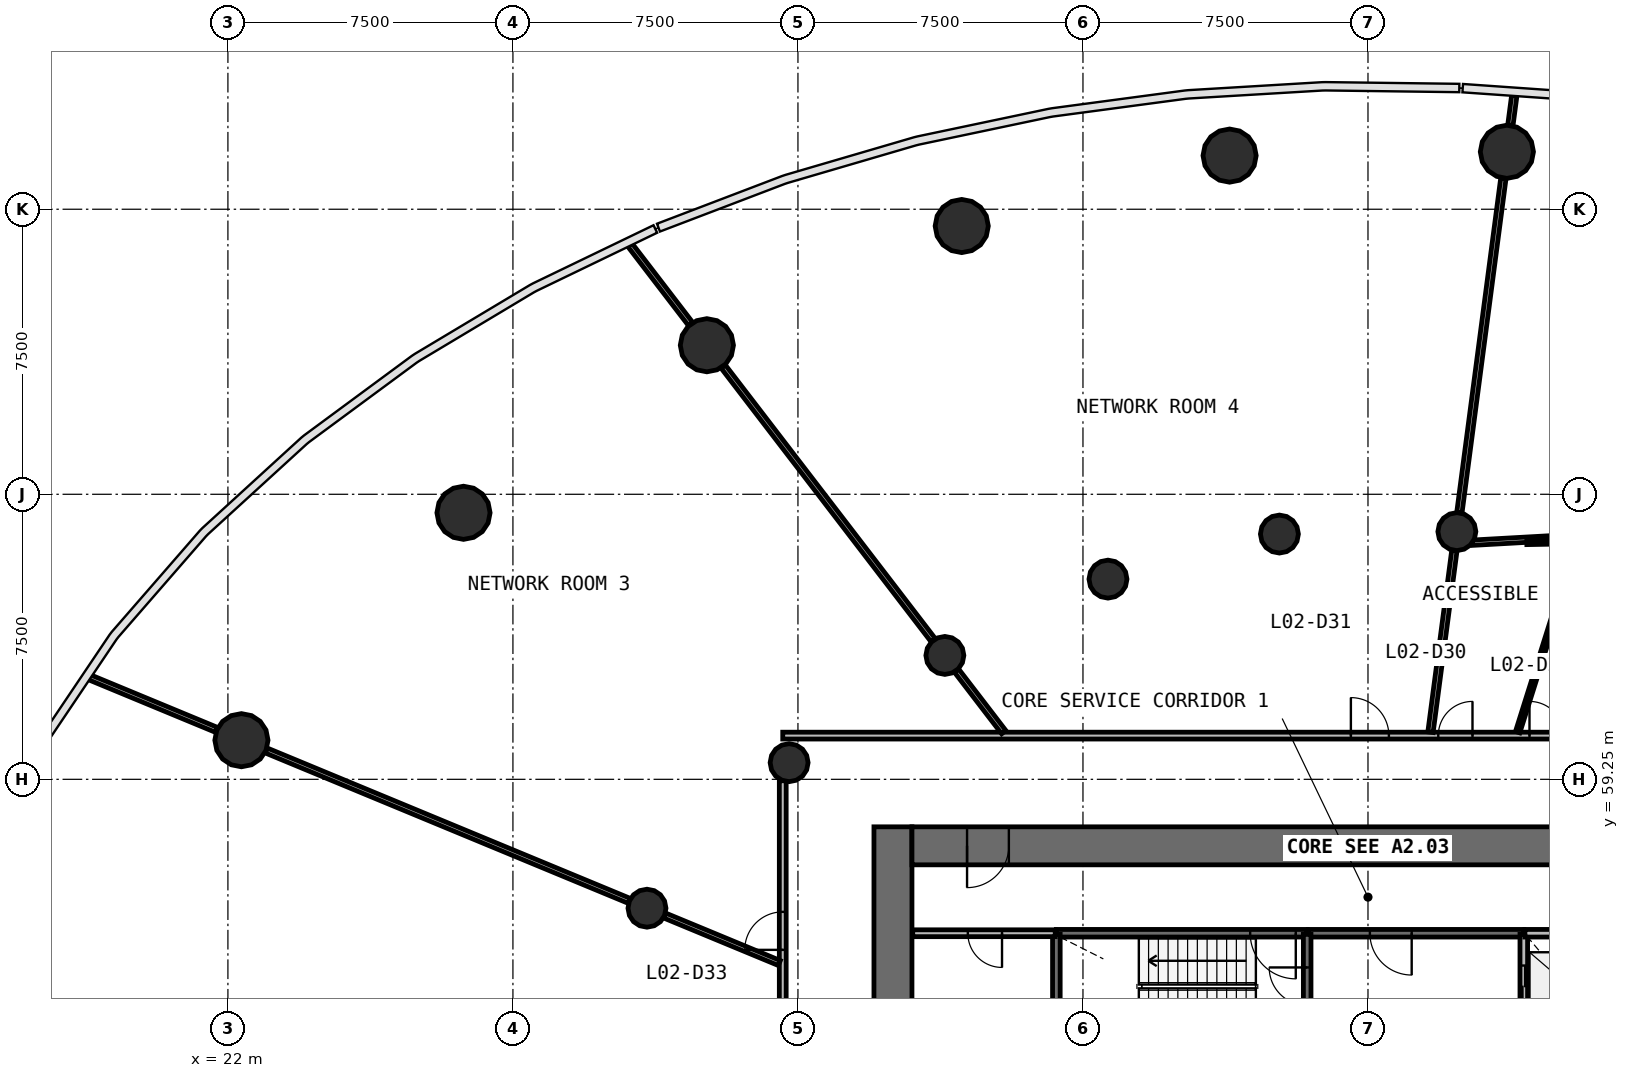
"""IFC4 building model, lengths in metres.
Left out: names, types, materials, properties, quantities, classifications, styles, units other than length and angle.
Written with IfcOpenShell. Run it as: python <this file> out.ifc"""

import sys

from ifc_helpers import new_model, si_unit, direction, frame, frame_2d, origin, origin_2d, place, context, subcontext, project, spatial, rectangle, circle, extrude, source, transform, mapped, element, fill, save


model = new_model("IFC4")
c1 = context("Model", 3, precision=1e-05, world=origin(), true_north=direction((0.0, 1.0)))
c2 = subcontext(c1, "Body", "Model", "MODEL_VIEW")
j1 = project(units=[si_unit("LENGTHUNIT", "METRE"), si_unit("PLANEANGLEUNIT", "RADIAN")], contexts=[c1])
p1 = place(None, origin())
s1 = spatial("IfcSite", under=j1, at=p1, CompositionType="ELEMENT")
p2 = place(p1, origin())
s2 = spatial("IfcBuilding", under=s1, at=p2, CompositionType="ELEMENT")
p3 = place(p2, frame((0.0, 0.0, 9.4)))
s3 = spatial("IfcBuildingStorey", under=s2, at=p3, CompositionType="ELEMENT", Elevation=9.4)
p4 = place(p3, frame((39.5, 58.0, 0.0), z_axis=(0.0, 0.0, 1.0), x_axis=(0.0, -1.0, 0.0)))
e1 = element("IfcWall", 1, at=p4, inside=s3, PredefinedType="SHEAR", context=c2, shape_type="SweptSolid", body=[
    extrude(rectangle(XDim=20.0, YDim=1.0, at=frame_2d((10.0, 0.0))), origin(), (0.0, 0.0, 1.0), 4.4),
])
p5 = place(p4, frame((9.1, 0.0, 0.0)))
e2 = element("IfcOpeningElement", 2, at=p5, cuts=e1, PredefinedType="OPENING", context=c2, shape_type="SweptSolid", body=[
    extrude(rectangle(XDim=1.8, YDim=2.1, at=frame_2d((0.9, 1.05))), frame((0.0, 0.51, 0.0), z_axis=(0.0, -1.0, 0.0), x_axis=(1.0, 0.0, 0.0)), (0.0, 0.0, 1.0), 1.02),
])
p6 = place(p3, frame((64.0, 57.5, 0.0), z_axis=(0.0, 0.0, 1.0), x_axis=(-1.0, 0.0, 0.0)))
e3 = element("IfcWall", 3, at=p6, inside=s3, PredefinedType="SHEAR", context=c2, shape_type="SweptSolid", body=[
    extrude(rectangle(XDim=24.0, YDim=1.0, at=frame_2d((12.0, 0.0))), origin(), (0.0, 0.0, 1.0), 4.4),
])
p7 = place(p6, frame((21.45, 0.0, 0.0)))
e4 = element("IfcOpeningElement", 4, at=p7, cuts=e3, PredefinedType="OPENING", context=c2, shape_type="SweptSolid", body=[
    extrude(rectangle(XDim=1.1, YDim=2.1, at=frame_2d((0.55, 1.05))), frame((0.0, 0.51, 0.0), z_axis=(0.0, -1.0, 0.0), x_axis=(1.0, 0.0, 0.0)), (0.0, 0.0, 1.0), 1.02),
])
p8 = place(p6, frame((1.95, 0.0, 0.0)))
e5 = element("IfcOpeningElement", 5, at=p8, cuts=e3, PredefinedType="OPENING", context=c2, shape_type="SweptSolid", body=[
    extrude(rectangle(XDim=1.1, YDim=2.1, at=frame_2d((0.55, 1.05))), frame((0.0, 0.51, 0.0), z_axis=(0.0, -1.0, 0.0), x_axis=(1.0, 0.0, 0.0)), (0.0, 0.0, 1.0), 1.02),
])
m1 = source(origin(), c2, "Body", "SweptSolid", [
    extrude(circle(Radius=0.7, at=origin_2d()), origin(), (0.0, 0.0, 1.0), 4.4),
])
for number, where, z_axis, x_axis in (
    (6, (55.655, 75.761, 0.0), (0.0, 0.0, 1.0), (1.0, 0.0, 0.0)),
    (7, (48.358, 75.661, 0.0), (0.0, 0.0, 1.0), (1.0, 0.0, 0.0)),
    (8, (41.31, 73.809, 0.0), (0.0, 0.0, 1.0), (1.0, 0.0, 0.0)),
    (9, (34.604, 70.672, 0.0), (0.0, 0.0, 1.0), (1.0, 0.0, 0.0)),
    (10, (28.199, 66.263, 0.0), (0.0, 0.0, 1.0), (1.0, 0.0, 0.0)),
    (11, (22.355, 60.279, 0.0), (0.0, 0.0, 1.0), (1.0, 0.0, 0.0)),
):
    element("IfcColumn", number, at=place(p3, frame(where, z_axis=z_axis, x_axis=x_axis)), inside=s3, PredefinedType="COLUMN", context=c2, shape_type="MappedRepresentation", body=[
        mapped(m1, transform((0.0, 0.0, 0.0), scale=1.0)),
    ])
m2 = source(origin(), c2, "Body", "SweptSolid", [
    extrude(circle(Radius=0.5, at=origin_2d()), origin(), (0.0, 0.0, 1.0), 4.4),
])
for number, where, z_axis, x_axis in (
    (12, (54.339, 65.767, 0.0), (0.0, 0.0, 1.0), (1.0, 0.0, 0.0)),
    (13, (49.669, 65.703, 0.0), (0.0, 0.0, 1.0), (1.0, 0.0, 0.0)),
    (14, (45.158, 64.518, 0.0), (0.0, 0.0, 1.0), (1.0, 0.0, 0.0)),
    (15, (40.866, 62.51, 0.0), (0.0, 0.0, 1.0), (1.0, 0.0, 0.0)),
    (16, (36.768, 59.688, 0.0), (0.0, 0.0, 1.0), (1.0, 0.0, 0.0)),
    (17, (33.028, 55.859, 0.0), (0.0, 0.0, 1.0), (1.0, 0.0, 0.0)),
):
    element("IfcColumn", number, at=place(p3, frame(where, z_axis=z_axis, x_axis=x_axis)), inside=s3, PredefinedType="COLUMN", context=c2, shape_type="MappedRepresentation", body=[
        mapped(m2, transform((0.0, 0.0, 0.0), scale=1.0)),
    ])
p9 = place(p3, frame((50.4, 55.2, 0.0), z_axis=(0.0, 0.0, 1.0), x_axis=(-1.0, 0.0, 0.0)))
e18 = element("IfcWall", 18, at=p9, inside=s3, PredefinedType="SOLIDWALL", context=c2, shape_type="SweptSolid", body=[
    extrude(rectangle(XDim=6.6, YDim=0.2, at=frame_2d((3.3, 0.0))), origin(), (0.0, 0.0, 1.0), 3.95),
])
p10 = place(p9, frame((0.3, 0.0, 0.0)))
e19 = element("IfcOpeningElement", 19, at=p10, cuts=e18, PredefinedType="OPENING", context=c2, shape_type="SweptSolid", body=[
    extrude(rectangle(XDim=1.2, YDim=2.1, at=frame_2d((0.6, 1.05))), frame((0.0, 0.11, 0.0), z_axis=(0.0, -1.0, 0.0), x_axis=(1.0, 0.0, 0.0)), (0.0, 0.0, 1.0), 0.22),
])
p11 = place(p3, frame((56.1, 55.2, 0.0), z_axis=(0.0, 0.0, 1.0), x_axis=(-1.0, 0.0, 0.0)))
e20 = element("IfcWall", 20, at=p11, inside=s3, PredefinedType="SOLIDWALL", context=c2, shape_type="SweptSolid", body=[
    extrude(rectangle(XDim=5.67, YDim=0.2, at=frame_2d((2.835, 0.0))), origin(), (0.0, 0.0, 1.0), 3.95),
])
p12 = place(p11, frame((2.95, 0.0, 0.0)))
e21 = element("IfcOpeningElement", 21, at=p12, cuts=e20, PredefinedType="OPENING", context=c2, shape_type="SweptSolid", body=[
    extrude(rectangle(XDim=1.1, YDim=2.1, at=frame_2d((0.55, 1.05))), frame((0.0, 0.11, 0.0), z_axis=(0.0, -1.0, 0.0), x_axis=(1.0, 0.0, 0.0)), (0.0, 0.0, 1.0), 0.22),
])
p13 = place(p3, frame((50.4, 52.4, 0.0), z_axis=(0.0, 0.0, 1.0), x_axis=(0.0, 1.0, 0.0)))
e22 = element("IfcWall", 22, at=p13, inside=s3, PredefinedType="SOLIDWALL", context=c2, shape_type="SweptSolid", body=[
    extrude(rectangle(XDim=2.77, YDim=0.2, at=frame_2d((1.385, 0.0))), origin(), (0.0, 0.0, 1.0), 3.95),
])
p14 = place(p13, frame((0.9, 0.0, 0.0)))
e23 = element("IfcOpeningElement", 23, at=p14, cuts=e22, PredefinedType="OPENING", context=c2, shape_type="SweptSolid", body=[
    extrude(rectangle(XDim=1.0, YDim=2.1, at=frame_2d((0.5, 1.05))), frame((0.0, 0.11, 0.0), z_axis=(0.0, -1.0, 0.0), x_axis=(1.0, 0.0, 0.0)), (0.0, 0.0, 1.0), 0.22),
])
p15 = place(p3, frame((56.1, 55.17, 0.0), z_axis=(0.0, 0.0, 1.0), x_axis=(0.0, -1.0, 0.0)))
e24 = element("IfcWall", 24, at=p15, inside=s3, PredefinedType="SOLIDWALL", context=c2, shape_type="SweptSolid", body=[
    extrude(rectangle(XDim=2.77, YDim=0.2, at=frame_2d((1.385, 0.0))), origin(), (0.0, 0.0, 1.0), 3.95),
])
p16 = place(p15, frame((0.82, 0.0, 0.0)))
e25 = element("IfcOpeningElement", 25, at=p16, cuts=e24, PredefinedType="OPENING", context=c2, shape_type="SweptSolid", body=[
    extrude(rectangle(XDim=1.1, YDim=2.1, at=frame_2d((0.55, 1.05))), frame((0.0, 0.11, 0.0), z_axis=(0.0, -1.0, 0.0), x_axis=(1.0, 0.0, 0.0)), (0.0, 0.0, 1.0), 0.22),
])
p17 = place(p3, frame((58.47, 55.2, 0.0), z_axis=(0.0, 0.0, 1.0), x_axis=(-1.0, 0.0, 0.0)))
e26 = element("IfcWall", 26, at=p17, inside=s3, PredefinedType="SOLIDWALL", context=c2, shape_type="SweptSolid", body=[
    extrude(rectangle(XDim=2.34, YDim=0.2, at=frame_2d((1.17, 0.0))), origin(), (0.0, 0.0, 1.0), 3.95),
])
p18 = place(p3, frame((43.8, 55.17, 0.0), z_axis=(0.0, 0.0, 1.0), x_axis=(0.0, -1.0, 0.0)))
e27 = element("IfcWall", 27, at=p18, inside=s3, PredefinedType="SOLIDWALL", context=c2, shape_type="SweptSolid", body=[
    extrude(rectangle(XDim=2.14, YDim=0.2, at=frame_2d((1.07, 0.0))), origin(), (0.0, 0.0, 1.0), 3.95),
])
p19 = place(p3, frame((36.6, 60.4, 0.0), z_axis=(0.0, 0.0, 1.0), x_axis=(1.0, 0.0, 0.0)))
e28 = element("IfcWall", 28, at=p19, inside=s3, PredefinedType="PARTITIONING", context=c2, shape_type="SweptSolid", body=[
    extrude(rectangle(XDim=30.8, YDim=0.18, at=frame_2d((15.4, 0.0))), origin(), (0.0, 0.0, 1.0), 3.15),
])
p20 = place(p19, frame((22.25, 0.0, 0.0)))
e29 = element("IfcOpeningElement", 29, at=p20, cuts=e28, PredefinedType="OPENING", context=c2, shape_type="SweptSolid", body=[
    extrude(rectangle(XDim=0.9, YDim=2.1, at=frame_2d((0.45, 1.05))), frame((0.0, 0.1, 0.0), z_axis=(0.0, -1.0, 0.0), x_axis=(1.0, 0.0, 0.0)), (0.0, 0.0, 1.0), 0.2),
])
p21 = place(p19, frame((19.65, 0.0, 0.0)))
e30 = element("IfcOpeningElement", 30, at=p21, cuts=e28, PredefinedType="OPENING", context=c2, shape_type="SweptSolid", body=[
    extrude(rectangle(XDim=0.9, YDim=2.1, at=frame_2d((0.45, 1.05))), frame((0.0, 0.1, 0.0), z_axis=(0.0, -1.0, 0.0), x_axis=(1.0, 0.0, 0.0)), (0.0, 0.0, 1.0), 0.2),
])
p22 = place(p19, frame((17.25, 0.0, 0.0)))
e31 = element("IfcOpeningElement", 31, at=p22, cuts=e28, PredefinedType="OPENING", context=c2, shape_type="SweptSolid", body=[
    extrude(rectangle(XDim=0.9, YDim=2.1, at=frame_2d((0.45, 1.05))), frame((0.0, 0.1, 0.0), z_axis=(0.0, -1.0, 0.0), x_axis=(1.0, 0.0, 0.0)), (0.0, 0.0, 1.0), 0.2),
])
p23 = place(p19, frame((14.95, 0.0, 0.0)))
e32 = element("IfcOpeningElement", 32, at=p23, cuts=e28, PredefinedType="OPENING", context=c2, shape_type="SweptSolid", body=[
    extrude(rectangle(XDim=1.0, YDim=2.1, at=frame_2d((0.5, 1.05))), frame((0.0, 0.1, 0.0), z_axis=(0.0, -1.0, 0.0), x_axis=(1.0, 0.0, 0.0)), (0.0, 0.0, 1.0), 0.2),
])
p24 = place(p3, frame((36.6, 35.63, 0.0), z_axis=(0.0, 0.0, 1.0), x_axis=(0.0, 1.0, 0.0)))
e33 = element("IfcWall", 33, at=p24, inside=s3, PredefinedType="PARTITIONING", context=c2, shape_type="SweptSolid", body=[
    extrude(rectangle(XDim=23.583, YDim=0.18, at=frame_2d((11.791, 0.0))), origin(), (0.0, 0.0, 1.0), 3.15),
])
p25 = place(p24, frame((19.133, 0.0, 0.0)))
e34 = element("IfcOpeningElement", 34, at=p25, cuts=e33, PredefinedType="OPENING", context=c2, shape_type="SweptSolid", body=[
    extrude(rectangle(XDim=1.0, YDim=2.1, at=frame_2d((0.5, 1.05))), frame((0.0, 0.1, 0.0), z_axis=(0.0, -1.0, 0.0), x_axis=(1.0, 0.0, 0.0)), (0.0, 0.0, 1.0), 0.2),
])
p26 = place(p24, frame((11.333, 0.0, 0.0)))
e35 = element("IfcOpeningElement", 35, at=p26, cuts=e33, PredefinedType="OPENING", context=c2, shape_type="SweptSolid", body=[
    extrude(rectangle(XDim=1.0, YDim=2.1, at=frame_2d((0.5, 1.05))), frame((0.0, 0.1, 0.0), z_axis=(0.0, -1.0, 0.0), x_axis=(1.0, 0.0, 0.0)), (0.0, 0.0, 1.0), 0.2),
])
p27 = place(p24, frame((9.133, 0.0, 0.0)))
e36 = element("IfcOpeningElement", 36, at=p27, cuts=e33, PredefinedType="OPENING", context=c2, shape_type="SweptSolid", body=[
    extrude(rectangle(XDim=1.0, YDim=2.1, at=frame_2d((0.5, 1.05))), frame((0.0, 0.1, 0.0), z_axis=(0.0, -1.0, 0.0), x_axis=(1.0, 0.0, 0.0)), (0.0, 0.0, 1.0), 0.2),
])
p28 = place(p3, frame((43.77, 55.2, 0.0), z_axis=(0.0, 0.0, 1.0), x_axis=(-1.0, 0.0, 0.0)))
e37 = element("IfcWall", 37, at=p28, inside=s3, PredefinedType="PARTITIONING", context=c2, shape_type="SweptSolid", body=[
    extrude(rectangle(XDim=3.75, YDim=0.18, at=frame_2d((1.875, 0.0))), origin(), (0.0, 0.0, 1.0), 3.95),
])
p29 = place(p28, frame((1.4, 0.0, 0.0)))
e38 = element("IfcOpeningElement", 38, at=p29, cuts=e37, PredefinedType="OPENING", context=c2, shape_type="SweptSolid", body=[
    extrude(rectangle(XDim=0.9, YDim=2.1, at=frame_2d((0.45, 1.05))), frame((0.0, 0.1, 0.0), z_axis=(0.0, -1.0, 0.0), x_axis=(1.0, 0.0, 0.0)), (0.0, 0.0, 1.0), 0.2),
])
p30 = place(p3, frame((65.886, 66.097, 0.0), z_axis=(0.0, 0.0, 1.0), x_axis=(-0.998446920343, -0.055711284828, 0.0)))
e39 = element("IfcWall", 39, at=p30, inside=s3, PredefinedType="PARTITIONING", context=c2, shape_type="SweptSolid", body=[
    extrude(rectangle(XDim=11.153, YDim=0.14, at=frame_2d((5.576, 0.0))), origin(), (0.0, 0.0, 1.0), 3.15),
])
p31 = place(p3, frame((32.561, 56.052, 0.0), z_axis=(0.0, 0.0, 1.0), x_axis=(-0.923874685699, 0.382695133396, 0.0)))
e40 = element("IfcWall", 40, at=p31, inside=s3, PredefinedType="PARTITIONING", context=c2, shape_type="SweptSolid", body=[
    extrude(rectangle(XDim=10.341, YDim=0.14, at=frame_2d((5.17, 0.0))), origin(), (0.0, 0.0, 1.0), 3.15),
])
p32 = place(p3, frame((40.559, 62.91, 0.0), z_axis=(0.0, 0.0, 1.0), x_axis=(-0.608770769454, 0.793346173028, 0.0)))
e41 = element("IfcWall", 41, at=p32, inside=s3, PredefinedType="PARTITIONING", context=c2, shape_type="SweptSolid", body=[
    extrude(rectangle(XDim=9.079, YDim=0.14, at=frame_2d((4.54, 0.0))), origin(), (0.0, 0.0, 1.0), 3.15),
])
p33 = place(p3, frame((54.405, 66.267, 0.0), z_axis=(0.0, 0.0, 1.0), x_axis=(0.130521426482, 0.991445488783, 0.0)))
e42 = element("IfcWall", 42, at=p33, inside=s3, PredefinedType="PARTITIONING", context=c2, shape_type="SweptSolid", body=[
    extrude(rectangle(XDim=8.872, YDim=0.14, at=frame_2d((4.436, 0.0))), origin(), (0.0, 0.0, 1.0), 3.15),
])
p34 = place(p3, frame((53.644, 60.49, 0.0), z_axis=(0.0, 0.0, 1.0), x_axis=(0.130523979823, 0.991445152639, 0.0)))
e43 = element("IfcWall", 43, at=p34, inside=s3, PredefinedType="PARTITIONING", context=c2, shape_type="SweptSolid", body=[
    extrude(rectangle(XDim=4.818, YDim=0.14, at=frame_2d((2.409, 0.0))), origin(), (0.0, 0.0, 1.0), 3.15),
])
p35 = place(p3, frame((21.704, 60.549, 0.0), z_axis=(0.0, 0.0, 1.0), x_axis=(-0.923890168451, 0.382657753926, 0.0)))
e44 = element("IfcWall", 44, at=p35, inside=s3, PredefinedType="PARTITIONING", context=c2, shape_type="SweptSolid", body=[
    extrude(rectangle(XDim=3.641, YDim=0.14, at=frame_2d((1.821, 0.0))), origin(), (0.0, 0.0, 1.0), 3.15),
])
p36 = place(p3, frame((36.51, 54.416, 0.0), z_axis=(0.0, 0.0, 1.0), x_axis=(-0.923911109142, 0.382607190737, 0.0)))
e45 = element("IfcWall", 45, at=p36, inside=s3, PredefinedType="PARTITIONING", context=c2, shape_type="SweptSolid", body=[
    extrude(rectangle(XDim=3.264, YDim=0.14, at=frame_2d((1.632, 0.0))), origin(), (0.0, 0.0, 1.0), 3.15),
])
p37 = place(p3, frame((34.175, 71.23, 0.0), z_axis=(0.0, 0.0, 1.0), x_axis=(-0.608811983243, 0.793314546104, 0.0)))
e46 = element("IfcWall", 46, at=p37, inside=s3, PredefinedType="PARTITIONING", context=c2, shape_type="SweptSolid", body=[
    extrude(rectangle(XDim=2.627, YDim=0.14, at=frame_2d((1.313, 0.0))), origin(), (0.0, 0.0, 1.0), 3.15),
])
p38 = place(p3, frame((42.416, 60.49, 0.0), z_axis=(0.0, 0.0, 1.0), x_axis=(-0.608727763541, 0.793379171578, 0.0)))
e47 = element("IfcWall", 47, at=p38, inside=s3, PredefinedType="PARTITIONING", context=c2, shape_type="SweptSolid", body=[
    extrude(rectangle(XDim=2.042, YDim=0.14, at=frame_2d((1.021, 0.0))), origin(), (0.0, 0.0, 1.0), 3.15),
])
p39 = place(p3, frame((55.747, 76.46, 0.0), z_axis=(0.0, 0.0, 1.0), x_axis=(0.130598952658, 0.991435279564, 0.0)))
e48 = element("IfcWall", 48, at=p39, inside=s3, PredefinedType="PARTITIONING", context=c2, shape_type="SweptSolid", body=[
    extrude(rectangle(XDim=0.787, YDim=0.14, at=frame_2d((0.394, 0.0))), origin(), (0.0, 0.0, 1.0), 3.15),
])
p40 = place(p3, frame((55.938, 60.49, 0.0), z_axis=(0.0, 0.0, 1.0), x_axis=(0.300725077107, 0.953710872329, 0.0)))
e49 = element("IfcWall", 49, at=p40, inside=s3, PredefinedType="PARTITIONING", context=c2, shape_type="SweptSolid", body=[
    extrude(rectangle(XDim=5.263, YDim=0.12, at=frame_2d((2.632, 0.0))), origin(), (0.0, 0.0, 1.0), 3.15),
])
p41 = place(p3, frame((57.458, 65.508, 0.0), z_axis=(0.0, 0.0, 1.0), x_axis=(-0.999842238965, -0.017762240348, 0.0)))
e50 = element("IfcWall", 50, at=p41, inside=s3, PredefinedType="PARTITIONING", context=c2, shape_type="SweptSolid", body=[
    extrude(rectangle(XDim=1.278, YDim=0.12, at=frame_2d((0.639, 0.0))), origin(), (0.0, 0.0, 1.0), 3.15),
])
m3 = source(origin(), c2, "Body", "SweptSolid", [
    extrude(rectangle(XDim=1.1, YDim=2.1, at=frame_2d((0.55, 1.05))), frame((0.0, 0.025, 0.0), z_axis=(0.0, -1.0, 0.0), x_axis=(1.0, 0.0, 0.0)), (0.0, 0.0, 1.0), 0.05),
])
p42 = place(p16, origin())
e51 = element("IfcDoor", 51, at=p42, inside=s3, OperationType="DOUBLE_DOOR_SLIDING", PredefinedType="USERDEFINED", context=c2, shape_type="MappedRepresentation", body=[
    mapped(m3, transform((0.0, 0.0, 0.0), scale=1.0)),
])
fill(e25, e51)
m4 = source(origin(), c2, "Body", "SweptSolid", [
    extrude(rectangle(XDim=1.2, YDim=2.1, at=frame_2d((0.6, 1.05))), frame((0.0, 0.025, 0.0), z_axis=(0.0, -1.0, 0.0), x_axis=(1.0, 0.0, 0.0)), (0.0, 0.0, 1.0), 0.05),
])
p43 = place(p10, origin())
e52 = element("IfcDoor", 52, at=p43, inside=s3, OperationType="SINGLE_SWING_LEFT", PredefinedType="DOOR", context=c2, shape_type="MappedRepresentation", body=[
    mapped(m4, transform((0.0, 0.0, 0.0), scale=1.0)),
])
fill(e19, e52)
m5 = source(origin(), c2, "Body", "SweptSolid", [
    extrude(rectangle(XDim=1.0, YDim=2.1, at=frame_2d((0.5, 1.05))), frame((0.0, 0.025, 0.0), z_axis=(0.0, -1.0, 0.0), x_axis=(1.0, 0.0, 0.0)), (0.0, 0.0, 1.0), 0.05),
])
p44 = place(p14, origin())
e53 = element("IfcDoor", 53, at=p44, inside=s3, OperationType="SINGLE_SWING_RIGHT", PredefinedType="DOOR", context=c2, shape_type="MappedRepresentation", body=[
    mapped(m5, transform((0.0, 0.0, 0.0), scale=1.0)),
])
fill(e23, e53)
m6 = source(origin(), c2, "Body", "SweptSolid", [
    extrude(rectangle(XDim=1.1, YDim=2.1, at=frame_2d((0.55, 1.05))), frame((0.0, 0.025, 0.0), z_axis=(0.0, -1.0, 0.0), x_axis=(1.0, 0.0, 0.0)), (0.0, 0.0, 1.0), 0.05),
])
p45 = place(p12, origin())
e54 = element("IfcDoor", 54, at=p45, inside=s3, OperationType="SINGLE_SWING_LEFT", PredefinedType="DOOR", context=c2, shape_type="MappedRepresentation", body=[
    mapped(m6, transform((0.0, 0.0, 0.0), scale=1.0)),
])
fill(e21, e54)
m7 = source(origin(), c2, "Body", "SweptSolid", [
    extrude(rectangle(XDim=1.1, YDim=2.1, at=frame_2d((0.55, 1.05))), frame((0.0, 0.025, 0.0), z_axis=(0.0, -1.0, 0.0), x_axis=(1.0, 0.0, 0.0)), (0.0, 0.0, 1.0), 0.05),
])
p46 = place(p7, origin())
e55 = element("IfcDoor", 55, at=p46, inside=s3, OperationType="SINGLE_SWING_RIGHT", PredefinedType="DOOR", context=c2, shape_type="MappedRepresentation", body=[
    mapped(m7, transform((0.0, 0.0, 0.0), scale=1.0)),
])
fill(e4, e55)
m8 = source(origin(), c2, "Body", "SweptSolid", [
    extrude(rectangle(XDim=0.9, YDim=2.1, at=frame_2d((0.45, 1.05))), frame((0.0, 0.025, 0.0), z_axis=(0.0, -1.0, 0.0), x_axis=(1.0, 0.0, 0.0)), (0.0, 0.0, 1.0), 0.05),
])
p47 = place(p21, origin())
e56 = element("IfcDoor", 56, at=p47, inside=s3, OperationType="SINGLE_SWING_LEFT", PredefinedType="DOOR", context=c2, shape_type="MappedRepresentation", body=[
    mapped(m8, transform((0.0, 0.0, 0.0), scale=1.0)),
])
fill(e30, e56)
p48 = place(p22, origin())
e57 = element("IfcDoor", 57, at=p48, inside=s3, OperationType="SINGLE_SWING_RIGHT", PredefinedType="DOOR", context=c2, shape_type="MappedRepresentation", body=[
    mapped(m8, transform((0.0, 0.0, 0.0), scale=1.0)),
])
fill(e31, e57)
m9 = source(origin(), c2, "Body", "SweptSolid", [
    extrude(rectangle(XDim=1.0, YDim=2.1, at=frame_2d((0.5, 1.05))), frame((0.0, 0.025, 0.0), z_axis=(0.0, -1.0, 0.0), x_axis=(1.0, 0.0, 0.0)), (0.0, 0.0, 1.0), 0.05),
])
p49 = place(p23, origin())
e58 = element("IfcDoor", 58, at=p49, inside=s3, OperationType="SINGLE_SWING_LEFT", PredefinedType="DOOR", context=c2, shape_type="MappedRepresentation", body=[
    mapped(m9, transform((0.0, 0.0, 0.0), scale=1.0)),
])
fill(e32, e58)
p50 = place(p25, origin())
e59 = element("IfcDoor", 59, at=p50, inside=s3, OperationType="SINGLE_SWING_LEFT", PredefinedType="DOOR", context=c2, shape_type="MappedRepresentation", body=[
    mapped(m9, transform((0.0, 0.0, 0.0), scale=1.0)),
])
fill(e34, e59)
m10 = source(origin(), c2, "Body", "SweptSolid", [
    extrude(rectangle(XDim=0.9, YDim=2.1, at=frame_2d((0.45, 1.05))), frame((0.0, 0.025, 0.0), z_axis=(0.0, -1.0, 0.0), x_axis=(1.0, 0.0, 0.0)), (0.0, 0.0, 1.0), 0.05),
])
p51 = place(p29, origin())
e60 = element("IfcDoor", 60, at=p51, inside=s3, OperationType="SINGLE_SWING_LEFT", PredefinedType="DOOR", context=c2, shape_type="MappedRepresentation", body=[
    mapped(m10, transform((0.0, 0.0, 0.0), scale=1.0)),
])
fill(e38, e60)
save(model, sys.argv[1])
